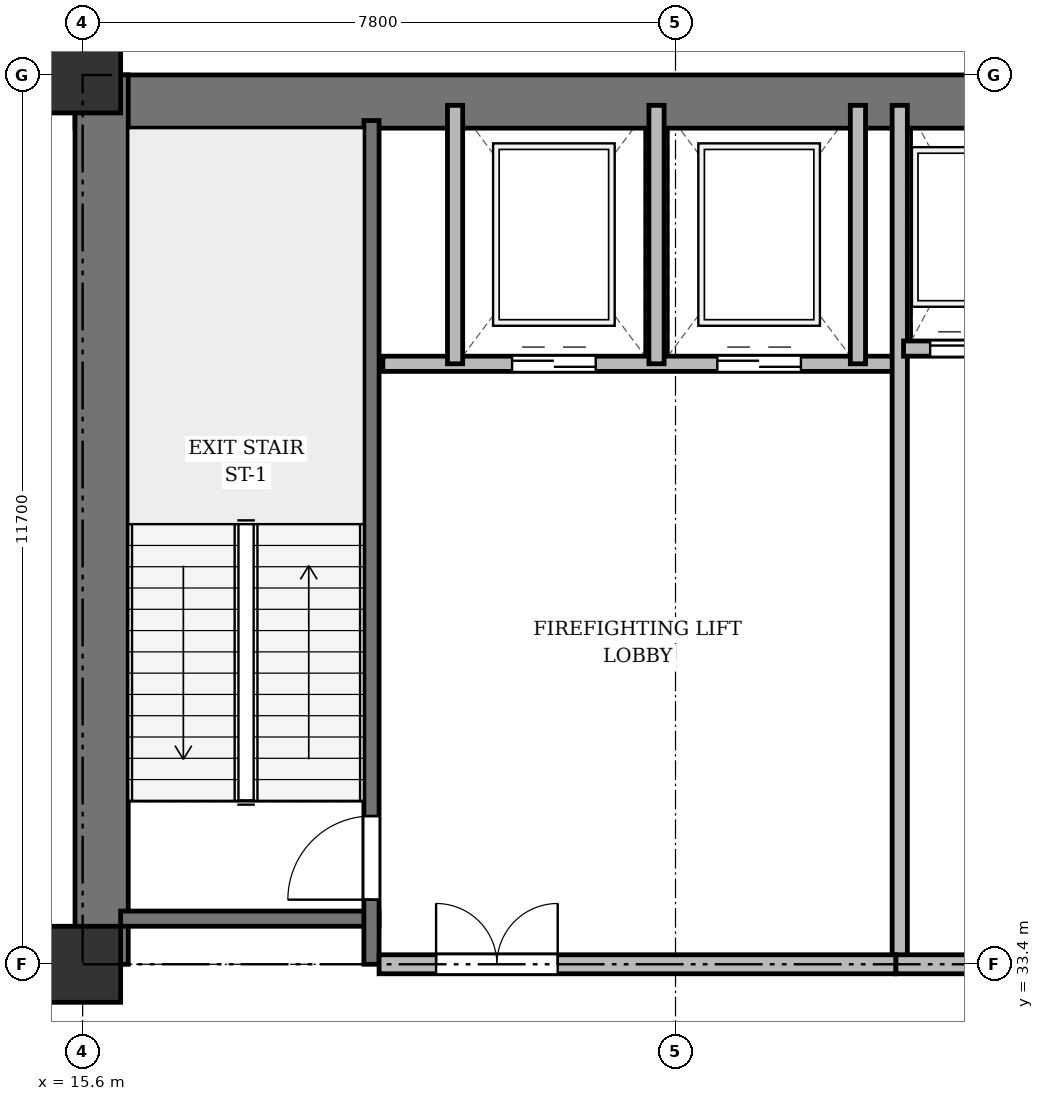
"""IFC4 building model, lengths in metres.
Left out: names, types, materials, properties, quantities, classifications, styles, units other than length and angle.
Written with IfcOpenShell. Run it as: python <this file> out.ifc"""

import sys

from ifc_helpers import new_model, si_unit, direction, frame, frame_2d, origin, origin_2d, place, context, subcontext, project, spatial, rectangle, extrude, source, transform, mapped, element, fill, save


model = new_model("IFC4")
c1 = context("Model", 3, precision=1e-05, world=origin(), true_north=direction((0.0, 1.0)))
c2 = subcontext(c1, "Body", "Model", "MODEL_VIEW")
j1 = project(units=[si_unit("LENGTHUNIT", "METRE"), si_unit("PLANEANGLEUNIT", "RADIAN")], contexts=[c1])
p1 = place(None, origin())
s1 = spatial("IfcSite", under=j1, at=p1, CompositionType="ELEMENT")
p2 = place(p1, origin())
s2 = spatial("IfcBuilding", under=s1, at=p2, CompositionType="ELEMENT")
p3 = place(p2, frame((0.0, 0.0, 18.7)))
s3 = spatial("IfcBuildingStorey", under=s2, at=p3, CompositionType="ELEMENT", Elevation=18.7)
m1 = source(origin(), c2, "Body", "SweptSolid", [
    extrude(rectangle(XDim=1.0, YDim=1.0, at=origin_2d()), origin(), (0.0, 0.0, 1.0), 4.8),
])
for number, where, z_axis, x_axis in (
    (1, (15.6, 33.4, 0.0), (0.0, 0.0, 1.0), (1.0, 0.0, 0.0)),
    (2, (15.6, 45.1, 0.0), (0.0, 0.0, 1.0), (1.0, 0.0, 0.0)),
):
    element("IfcColumn", number, at=place(p3, frame(where, z_axis=z_axis, x_axis=x_axis)), inside=s3, PredefinedType="COLUMN", context=c2, shape_type="MappedRepresentation", body=[
        mapped(m1, transform((0.0, 0.0, 0.0), x_axis=(1.0, 0.0, 0.0), y_axis=(0.0, 1.0, 0.0), z_axis=(0.0, 0.0, 1.0), scale=1.0)),
    ])
p4 = place(p3, frame((15.5, 44.75, 0.0), z_axis=(0.0, 0.0, 1.0), x_axis=(1.0, 0.0, 0.0)))
e3 = element("IfcWall", 3, at=p4, inside=s3, PredefinedType="SHEAR", context=c2, shape_type="SweptSolid", body=[
    extrude(rectangle(XDim=43.4, YDim=0.7, at=frame_2d((21.7, 0.0))), origin(), (0.0, 0.0, 1.0), 4.42),
])
p5 = place(p3, frame((15.85, 33.4, 0.0), z_axis=(0.0, 0.0, 1.0), x_axis=(0.0, 1.0, 0.0)))
e4 = element("IfcWall", 4, at=p5, inside=s3, PredefinedType="SHEAR", context=c2, shape_type="SweptSolid", body=[
    extrude(rectangle(XDim=11.7, YDim=0.7, at=frame_2d((5.85, 0.0))), origin(), (0.0, 0.0, 1.0), 4.42),
])
p6 = place(p3, frame((16.1, 34.0, 0.0), z_axis=(0.0, 0.0, 1.0), x_axis=(1.0, 0.0, 0.0)))
e5 = element("IfcWall", 5, at=p6, inside=s3, PredefinedType="SHEAR", context=c2, shape_type="SweptSolid", body=[
    extrude(rectangle(XDim=3.4, YDim=0.2, at=frame_2d((1.7, 0.0))), origin(), (0.0, 0.0, 1.0), 4.42),
])
p7 = place(p3, frame((19.4, 33.4, 0.0), z_axis=(0.0, 0.0, 1.0), x_axis=(0.0, 1.0, 0.0)))
e6 = element("IfcWall", 6, at=p7, inside=s3, PredefinedType="SHEAR", context=c2, shape_type="SweptSolid", body=[
    extrude(rectangle(XDim=11.1, YDim=0.2, at=frame_2d((5.55, 0.0))), origin(), (0.0, 0.0, 1.0), 4.42),
])
p8 = place(p7, frame((0.85, 0.0, 0.0)))
e7 = element("IfcOpeningElement", 7, at=p8, cuts=e6, PredefinedType="OPENING", context=c2, shape_type="SweptSolid", body=[
    extrude(rectangle(XDim=1.1, YDim=2.15, at=frame_2d((0.55, 1.075))), frame((0.0, 0.11, 0.0), z_axis=(0.0, -1.0, 0.0), x_axis=(1.0, 0.0, 0.0)), (0.0, 0.0, 1.0), 0.22),
])
p9 = place(p3, frame((19.55, 41.3, 0.0), z_axis=(0.0, 0.0, 1.0), x_axis=(1.0, 0.0, 0.0)))
e8 = element("IfcWall", 8, at=p9, inside=s3, PredefinedType="SOLIDWALL", context=c2, shape_type="SweptSolid", body=[
    extrude(rectangle(XDim=6.75, YDim=0.2, at=frame_2d((3.375, 0.0))), origin(), (0.0, 0.0, 1.0), 4.42),
])
p10 = place(p9, frame((1.7, 0.0, 0.0)))
e9 = element("IfcOpeningElement", 9, at=p10, cuts=e8, PredefinedType="OPENING", context=c2, shape_type="SweptSolid", body=[
    extrude(rectangle(XDim=1.1, YDim=2.15, at=frame_2d((0.55, 1.075))), frame((0.0, 0.11, 0.0), z_axis=(0.0, -1.0, 0.0), x_axis=(1.0, 0.0, 0.0)), (0.0, 0.0, 1.0), 0.22),
])
p11 = place(p9, frame((4.4, 0.0, 0.0)))
e10 = element("IfcOpeningElement", 10, at=p11, cuts=e8, PredefinedType="OPENING", context=c2, shape_type="SweptSolid", body=[
    extrude(rectangle(XDim=1.1, YDim=2.15, at=frame_2d((0.55, 1.075))), frame((0.0, 0.11, 0.0), z_axis=(0.0, -1.0, 0.0), x_axis=(1.0, 0.0, 0.0)), (0.0, 0.0, 1.0), 0.22),
])
for number, where, z_axis, x_axis in (
    (11, (20.5, 41.3, 0.0), (0.0, 0.0, 1.0), (0.0, 1.0, 0.0)),
    (12, (23.15, 41.3, 0.0), (0.0, 0.0, 1.0), (0.0, 1.0, 0.0)),
    (13, (25.8, 41.3, 0.0), (0.0, 0.0, 1.0), (0.0, 1.0, 0.0)),
):
    element("IfcWall", number, at=place(p3, frame(where, z_axis=z_axis, x_axis=x_axis)), inside=s3, PredefinedType="SOLIDWALL", context=c2, shape_type="SweptSolid", body=[
        extrude(rectangle(XDim=3.4, YDim=0.2, at=frame_2d((1.7, 0.0))), origin(), (0.0, 0.0, 1.0), 4.42),
    ])
p12 = place(p3, frame((26.35, 33.4, 0.0), z_axis=(0.0, 0.0, 1.0), x_axis=(0.0, 1.0, 0.0)))
e14 = element("IfcWall", 14, at=p12, inside=s3, PredefinedType="SOLIDWALL", context=c2, shape_type="SweptSolid", body=[
    extrude(rectangle(XDim=11.3, YDim=0.2, at=frame_2d((5.65, 0.0))), origin(), (0.0, 0.0, 1.0), 2.62),
])
p13 = place(p3, frame((19.5, 33.4, 0.0), z_axis=(0.0, 0.0, 1.0), x_axis=(1.0, 0.0, 0.0)))
e15 = element("IfcWall", 15, at=p13, inside=s3, PredefinedType="PARTITIONING", context=c2, shape_type="SweptSolid", body=[
    extrude(rectangle(XDim=6.8, YDim=0.25, at=frame_2d((3.4, 0.0))), origin(), (0.0, 0.0, 1.0), 2.62),
])
p14 = place(p13, frame((0.75, 0.0, 0.0)))
e16 = element("IfcOpeningElement", 16, at=p14, cuts=e15, PredefinedType="OPENING", context=c2, shape_type="SweptSolid", body=[
    extrude(rectangle(XDim=1.6, YDim=2.2, at=frame_2d((0.8, 1.1))), frame((0.0, 0.135, 0.0), z_axis=(0.0, -1.0, 0.0), x_axis=(1.0, 0.0, 0.0)), (0.0, 0.0, 1.0), 0.27),
])
p15 = place(p3, frame((26.4, 41.5, 0.0), z_axis=(0.0, 0.0, 1.0), x_axis=(1.0, 0.0, 0.0)))
e17 = element("IfcWall", 17, at=p15, inside=s3, PredefinedType="SOLIDWALL", context=c2, shape_type="SweptSolid", body=[
    extrude(rectangle(XDim=6.95, YDim=0.2, at=frame_2d((3.475, 0.0))), origin(), (0.0, 0.0, 1.0), 4.42),
])
p16 = place(p15, frame((0.35, 0.0, 0.0)))
e18 = element("IfcOpeningElement", 18, at=p16, cuts=e17, PredefinedType="OPENING", context=c2, shape_type="SweptSolid", body=[
    extrude(rectangle(XDim=1.05, YDim=2.15, at=frame_2d((0.525, 1.075))), frame((0.0, 0.11, 0.0), z_axis=(0.0, -1.0, 0.0), x_axis=(1.0, 0.0, 0.0)), (0.0, 0.0, 1.0), 0.22),
])
p17 = place(p15, frame((2.05, 0.0, 0.0)))
e19 = element("IfcOpeningElement", 19, at=p17, cuts=e17, PredefinedType="OPENING", context=c2, shape_type="SweptSolid", body=[
    extrude(rectangle(XDim=1.05, YDim=2.15, at=frame_2d((0.525, 1.075))), frame((0.0, 0.11, 0.0), z_axis=(0.0, -1.0, 0.0), x_axis=(1.0, 0.0, 0.0)), (0.0, 0.0, 1.0), 0.22),
])
p18 = place(p15, frame((3.75, 0.0, 0.0)))
e20 = element("IfcOpeningElement", 20, at=p18, cuts=e17, PredefinedType="OPENING", context=c2, shape_type="SweptSolid", body=[
    extrude(rectangle(XDim=1.05, YDim=2.15, at=frame_2d((0.525, 1.075))), frame((0.0, 0.11, 0.0), z_axis=(0.0, -1.0, 0.0), x_axis=(1.0, 0.0, 0.0)), (0.0, 0.0, 1.0), 0.22),
])
p19 = place(p15, frame((5.45, 0.0, 0.0)))
e21 = element("IfcOpeningElement", 21, at=p19, cuts=e17, PredefinedType="OPENING", context=c2, shape_type="SweptSolid", body=[
    extrude(rectangle(XDim=1.05, YDim=2.15, at=frame_2d((0.525, 1.075))), frame((0.0, 0.11, 0.0), z_axis=(0.0, -1.0, 0.0), x_axis=(1.0, 0.0, 0.0)), (0.0, 0.0, 1.0), 0.22),
])
p20 = place(p3, frame((26.3, 33.4, 0.0), z_axis=(0.0, 0.0, 1.0), x_axis=(1.0, 0.0, 0.0)))
e22 = element("IfcWall", 22, at=p20, inside=s3, PredefinedType="PARTITIONING", context=c2, shape_type="SweptSolid", body=[
    extrude(rectangle(XDim=20.85, YDim=0.25, at=frame_2d((10.425, 0.0))), origin(), (0.0, 0.0, 1.0), 2.62),
])
p21 = place(p20, frame((9.2, 0.0, 0.0)))
e23 = element("IfcOpeningElement", 23, at=p21, cuts=e22, PredefinedType="OPENING", context=c2, shape_type="SweptSolid", body=[
    extrude(rectangle(XDim=1.6, YDim=2.2, at=frame_2d((0.8, 1.1))), frame((0.0, 0.135, 0.0), z_axis=(0.0, -1.0, 0.0), x_axis=(1.0, 0.0, 0.0)), (0.0, 0.0, 1.0), 0.27),
])
p22 = place(p3, frame((0.45, 33.4, 0.0), z_axis=(0.0, 0.0, 1.0), x_axis=(1.0, 0.0, 0.0)))
e24 = element("IfcWall", 24, at=p22, inside=s3, PredefinedType="PARTITIONING", context=c2, shape_type="SweptSolid", body=[
    extrude(rectangle(XDim=15.35, YDim=0.15, at=frame_2d((7.675, 0.0))), origin(), (0.0, 0.0, 1.0), 2.62),
])
p23 = place(p22, frame((8.679, 0.0, 0.0)))
e25 = element("IfcOpeningElement", 25, at=p23, cuts=e24, PredefinedType="OPENING", context=c2, shape_type="SweptSolid", body=[
    extrude(rectangle(XDim=1.6, YDim=2.2, at=frame_2d((0.8, 1.1))), frame((0.0, 0.085, 0.0), z_axis=(0.0, -1.0, 0.0), x_axis=(1.0, 0.0, 0.0)), (0.0, 0.0, 1.0), 0.17),
])
m2 = source(origin(), c2, "Body", "SweptSolid", [
    extrude(rectangle(XDim=1.1, YDim=2.15, at=frame_2d((0.55, 1.075))), frame((0.0, 0.025, 0.0), z_axis=(0.0, -1.0, 0.0), x_axis=(1.0, 0.0, 0.0)), (0.0, 0.0, 1.0), 0.05),
])
p24 = place(p8, origin())
e26 = element("IfcDoor", 26, at=p24, inside=s3, OperationType="SINGLE_SWING_LEFT", PredefinedType="DOOR", context=c2, shape_type="MappedRepresentation", body=[
    mapped(m2, transform((0.0, 0.0, 0.0), x_axis=(1.0, 0.0, 0.0), y_axis=(0.0, 1.0, 0.0), z_axis=(0.0, 0.0, 1.0), scale=1.0)),
])
fill(e7, e26)
p25 = place(p10, origin())
e27 = element("IfcDoor", 27, at=p25, inside=s3, OperationType="DOUBLE_DOOR_SLIDING", PredefinedType="DOOR", context=c2, shape_type="MappedRepresentation", body=[
    mapped(m2, transform((0.0, 0.0, 0.0), x_axis=(1.0, 0.0, 0.0), y_axis=(0.0, 1.0, 0.0), z_axis=(0.0, 0.0, 1.0), scale=1.0)),
])
fill(e9, e27)
p26 = place(p11, origin())
e28 = element("IfcDoor", 28, at=p26, inside=s3, OperationType="DOUBLE_DOOR_SLIDING", PredefinedType="DOOR", context=c2, shape_type="MappedRepresentation", body=[
    mapped(m2, transform((0.0, 0.0, 0.0), x_axis=(1.0, 0.0, 0.0), y_axis=(0.0, 1.0, 0.0), z_axis=(0.0, 0.0, 1.0), scale=1.0)),
])
fill(e10, e28)
m3 = source(origin(), c2, "Body", "SweptSolid", [
    extrude(rectangle(XDim=1.6, YDim=2.2, at=frame_2d((0.8, 1.1))), frame((0.0, 0.025, 0.0), z_axis=(0.0, -1.0, 0.0), x_axis=(1.0, 0.0, 0.0)), (0.0, 0.0, 1.0), 0.05),
])
p27 = place(p14, origin())
e29 = element("IfcDoor", 29, at=p27, inside=s3, OperationType="DOUBLE_DOOR_SINGLE_SWING", PredefinedType="DOOR", context=c2, shape_type="MappedRepresentation", body=[
    mapped(m3, transform((0.0, 0.0, 0.0), x_axis=(1.0, 0.0, 0.0), y_axis=(0.0, 1.0, 0.0), z_axis=(0.0, 0.0, 1.0), scale=1.0)),
])
fill(e16, e29)
m4 = source(origin(), c2, "Body", "SweptSolid", [
    extrude(rectangle(XDim=1.05, YDim=2.15, at=frame_2d((0.525, 1.075))), frame((0.0, 0.025, 0.0), z_axis=(0.0, -1.0, 0.0), x_axis=(1.0, 0.0, 0.0)), (0.0, 0.0, 1.0), 0.05),
])
p28 = place(p16, origin())
e30 = element("IfcDoor", 30, at=p28, inside=s3, OperationType="DOUBLE_DOOR_SLIDING", PredefinedType="DOOR", context=c2, shape_type="MappedRepresentation", body=[
    mapped(m4, transform((0.0, 0.0, 0.0), x_axis=(1.0, 0.0, 0.0), y_axis=(0.0, 1.0, 0.0), z_axis=(0.0, 0.0, 1.0), scale=1.0)),
])
fill(e18, e30)
save(model, sys.argv[1])
